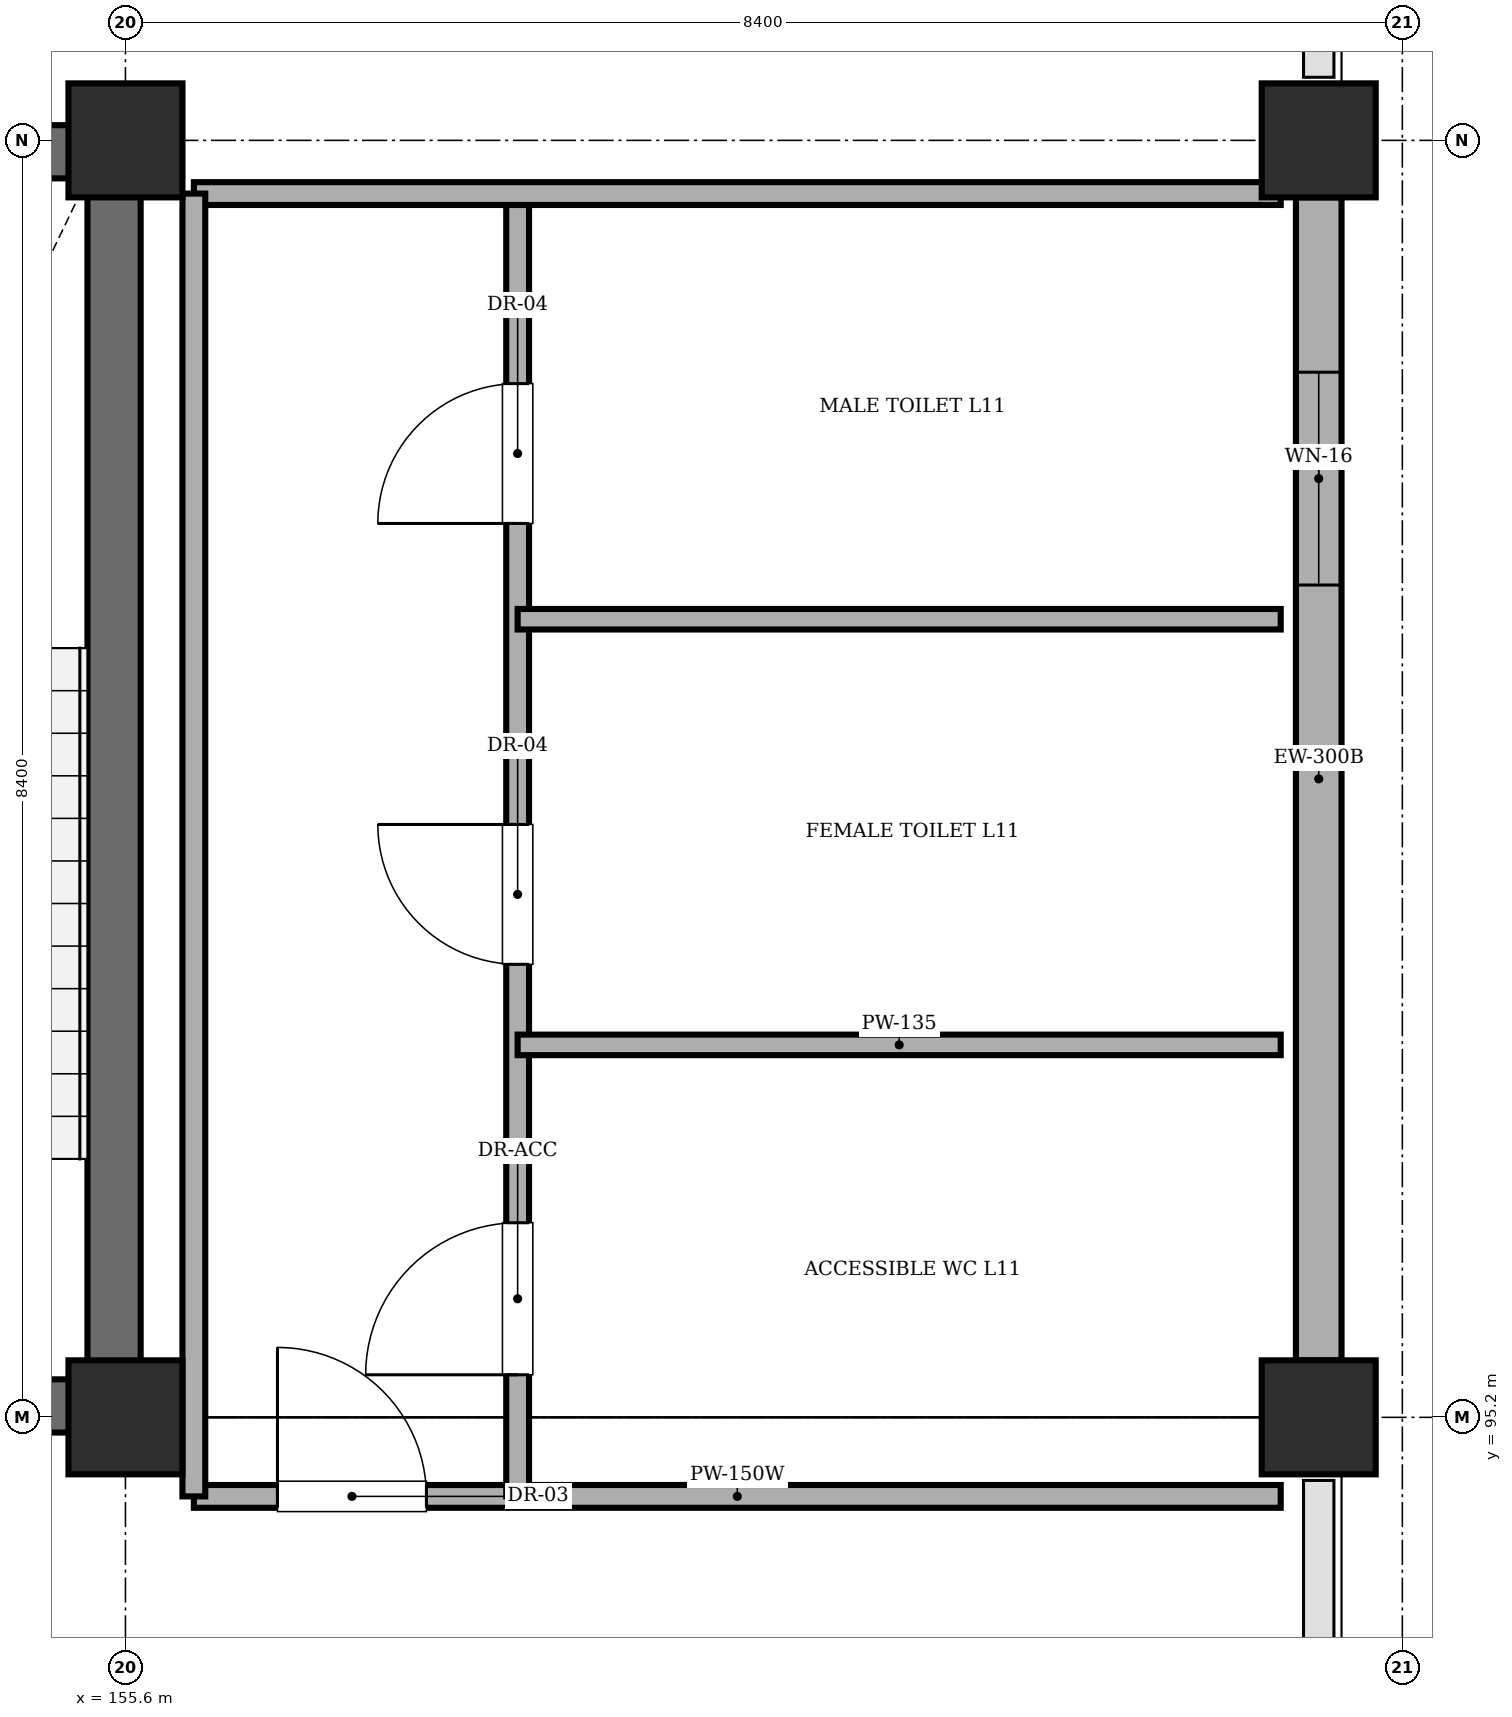
"""IFC4 building model, lengths in metres.
Left out: names, types, materials, properties, quantities, classifications, styles, units other than length and angle.
Written with IfcOpenShell. Run it as: python <this file> out.ifc"""

import sys

from ifc_helpers import new_model, si_unit, direction, frame, frame_2d, origin, origin_2d, place, context, subcontext, project, spatial, rectangle, extrude, element, fill, save


model = new_model("IFC4")
c1 = context("Model", 3, precision=1e-05, world=origin(), true_north=direction((0.0, 1.0)))
c2 = subcontext(c1, "Body", "Model", "MODEL_VIEW")
j1 = project(units=[si_unit("LENGTHUNIT", "METRE"), si_unit("PLANEANGLEUNIT", "RADIAN")], contexts=[c1])
p1 = place(None, origin())
s1 = spatial("IfcSite", under=j1, at=p1, CompositionType="ELEMENT")
p2 = place(p1, origin())
s2 = spatial("IfcBuilding", under=s1, at=p2, CompositionType="ELEMENT")
p3 = place(p2, frame((0.0, 0.0, 44.4)))
s3 = spatial("IfcBuildingStorey", under=s2, at=p3, CompositionType="ELEMENT", Elevation=44.4)
for number, where, z_axis, x_axis in (
    (1, (155.6, 95.2, 0.0), (0.0, 0.0, 1.0), (1.0, 0.0, 0.0)),
    (2, (155.6, 103.6, 0.0), (0.0, 0.0, 1.0), (1.0, 0.0, 0.0)),
    (3, (163.45, 95.2, 0.0), (0.0, 0.0, 1.0), (1.0, 0.0, 0.0)),
    (4, (163.45, 103.6, 0.0), (0.0, 0.0, 1.0), (1.0, 0.0, 0.0)),
):
    element("IfcColumn", number, at=place(p3, frame(where, z_axis=z_axis, x_axis=x_axis)), inside=s3, PredefinedType="COLUMN", context=c2, shape_type="SweptSolid", body=[
        extrude(rectangle(XDim=0.75, YDim=0.75, at=origin_2d()), origin(), (0.0, 0.0, 1.0), 4.01),
    ])
for number, where, z_axis, x_axis in (
    (5, (151.9, 95.275, 0.0), (0.0, 0.0, 1.0), (1.0, 0.0, 0.0)),
    (6, (151.9, 103.525, 0.0), (0.0, 0.0, 1.0), (1.0, 0.0, 0.0)),
):
    element("IfcWall", number, at=place(p3, frame(where, z_axis=z_axis, x_axis=x_axis)), inside=s3, PredefinedType="SHEAR", context=c2, shape_type="SweptSolid", body=[
        extrude(rectangle(XDim=3.8, YDim=0.35, at=frame_2d((1.9, 0.0))), origin(), (0.0, 0.0, 1.0), 4.01),
    ])
p4 = place(p3, frame((155.525, 95.45, 0.0), z_axis=(0.0, 0.0, 1.0), x_axis=(0.0, 1.0, 0.0)))
e7 = element("IfcWall", 7, at=p4, inside=s3, PredefinedType="SHEAR", context=c2, shape_type="SweptSolid", body=[
    extrude(rectangle(XDim=7.9, YDim=0.35, at=frame_2d((3.95, 0.0))), origin(), (0.0, 0.0, 1.0), 4.01),
])
p5 = place(p3, frame((163.45, 103.225, 0.0), z_axis=(0.0, 0.0, 1.0), x_axis=(0.0, -1.0, 0.0)))
e8 = element("IfcWall", 8, at=p5, inside=s3, PredefinedType="STANDARD", context=c2, shape_type="SweptSolid", body=[
    extrude(rectangle(XDim=7.65, YDim=0.3, at=frame_2d((3.825, 0.0))), origin(), (0.0, 0.0, 1.0), 3.31),
])
p6 = place(p5, frame((1.15, 0.0, 1.1)))
e9 = element("IfcOpeningElement", 9, at=p6, cuts=e8, PredefinedType="OPENING", context=c2, shape_type="SweptSolid", body=[
    extrude(rectangle(XDim=1.4, YDim=1.4, at=frame_2d((0.7, 0.7))), frame((0.0, 0.16, 0.0), z_axis=(0.0, -1.0, 0.0), x_axis=(1.0, 0.0, 0.0)), (0.0, 0.0, 1.0), 0.32),
])
p7 = place(p3, frame((156.05, 94.68, 0.0), z_axis=(0.0, 0.0, 1.0), x_axis=(1.0, 0.0, 0.0)))
e10 = element("IfcWall", 10, at=p7, inside=s3, PredefinedType="PARTITIONING", context=c2, shape_type="SweptSolid", body=[
    extrude(rectangle(XDim=7.15, YDim=0.15, at=frame_2d((3.575, 0.0))), origin(), (0.0, 0.0, 1.0), 4.01),
])
p8 = place(p7, frame((0.55, 0.0, 0.0)))
e11 = element("IfcOpeningElement", 11, at=p8, cuts=e10, PredefinedType="OPENING", context=c2, shape_type="SweptSolid", body=[
    extrude(rectangle(XDim=0.98, YDim=2.12, at=frame_2d((0.49, 1.06))), frame((0.0, 0.085, 0.0), z_axis=(0.0, -1.0, 0.0), x_axis=(1.0, 0.0, 0.0)), (0.0, 0.0, 1.0), 0.17),
])
p9 = place(p3, frame((158.18, 94.68, 0.0), z_axis=(0.0, 0.0, 1.0), x_axis=(0.0, 1.0, 0.0)))
e12 = element("IfcWall", 12, at=p9, inside=s3, PredefinedType="PARTITIONING", context=c2, shape_type="SweptSolid", body=[
    extrude(rectangle(XDim=8.57, YDim=0.15, at=frame_2d((4.285, 0.0))), origin(), (0.0, 0.0, 1.0), 4.01),
])
p10 = place(p9, frame((0.8, 0.0, 0.0)))
e13 = element("IfcOpeningElement", 13, at=p10, cuts=e12, PredefinedType="OPENING", context=c2, shape_type="SweptSolid", body=[
    extrude(rectangle(XDim=1.0, YDim=2.12, at=frame_2d((0.5, 1.06))), frame((0.0, 0.085, 0.0), z_axis=(0.0, -1.0, 0.0), x_axis=(1.0, 0.0, 0.0)), (0.0, 0.0, 1.0), 0.17),
])
p11 = place(p9, frame((3.5, 0.0, 0.0)))
e14 = element("IfcOpeningElement", 14, at=p11, cuts=e12, PredefinedType="OPENING", context=c2, shape_type="SweptSolid", body=[
    extrude(rectangle(XDim=0.92, YDim=2.1, at=frame_2d((0.46, 1.05))), frame((0.0, 0.085, 0.0), z_axis=(0.0, -1.0, 0.0), x_axis=(1.0, 0.0, 0.0)), (0.0, 0.0, 1.0), 0.17),
])
p12 = place(p9, frame((6.4, 0.0, 0.0)))
e15 = element("IfcOpeningElement", 15, at=p12, cuts=e12, PredefinedType="OPENING", context=c2, shape_type="SweptSolid", body=[
    extrude(rectangle(XDim=0.92, YDim=2.1, at=frame_2d((0.46, 1.05))), frame((0.0, 0.085, 0.0), z_axis=(0.0, -1.0, 0.0), x_axis=(1.0, 0.0, 0.0)), (0.0, 0.0, 1.0), 0.17),
])
for number, where, z_axis, x_axis in (
    (16, (158.18, 97.65, 0.0), (0.0, 0.0, 1.0), (1.0, 0.0, 0.0)),
    (17, (158.18, 100.45, 0.0), (0.0, 0.0, 1.0), (1.0, 0.0, 0.0)),
):
    element("IfcWall", number, at=place(p3, frame(where, z_axis=z_axis, x_axis=x_axis)), inside=s3, PredefinedType="PARTITIONING", context=c2, shape_type="SweptSolid", body=[
        extrude(rectangle(XDim=5.02, YDim=0.135, at=frame_2d((2.51, 0.0))), origin(), (0.0, 0.0, 1.0), 4.01),
    ])
p13 = place(p3, frame((156.05, 103.25, 0.0), z_axis=(0.0, 0.0, 1.0), x_axis=(1.0, 0.0, 0.0)))
e18 = element("IfcWall", 18, at=p13, inside=s3, PredefinedType="PARTITIONING", context=c2, shape_type="SweptSolid", body=[
    extrude(rectangle(XDim=7.15, YDim=0.15, at=frame_2d((3.575, 0.0))), origin(), (0.0, 0.0, 1.0), 4.01),
])
p14 = place(p3, frame((156.05, 94.68, 0.0), z_axis=(0.0, 0.0, 1.0), x_axis=(0.0, 1.0, 0.0)))
e19 = element("IfcWall", 19, at=p14, inside=s3, PredefinedType="PARTITIONING", context=c2, shape_type="SweptSolid", body=[
    extrude(rectangle(XDim=8.57, YDim=0.15, at=frame_2d((4.285, 0.0))), origin(), (0.0, 0.0, 1.0), 4.01),
])
p15 = place(p6, origin())
e20 = element("IfcWindow", 20, at=p15, inside=s3, PartitioningType="SINGLE_PANEL", PredefinedType="WINDOW", context=c2, shape_type="SweptSolid", body=[
    extrude(rectangle(XDim=1.4, YDim=1.4, at=frame_2d((0.7, 0.7))), frame((0.0, 0.03, 0.0), z_axis=(0.0, -1.0, 0.0), x_axis=(1.0, 0.0, 0.0)), (0.0, 0.0, 1.0), 0.06),
])
fill(e9, e20)
p16 = place(p8, origin())
e21 = element("IfcDoor", 21, at=p16, inside=s3, OperationType="SINGLE_SWING_LEFT", PredefinedType="DOOR", context=c2, shape_type="SweptSolid", body=[
    extrude(rectangle(XDim=0.98, YDim=2.12, at=frame_2d((0.49, 1.06))), frame((0.0, 0.025, 0.0), z_axis=(0.0, -1.0, 0.0), x_axis=(1.0, 0.0, 0.0)), (0.0, 0.0, 1.0), 0.05),
])
fill(e11, e21)
p17 = place(p10, origin())
e22 = element("IfcDoor", 22, at=p17, inside=s3, OperationType="SINGLE_SWING_LEFT", PredefinedType="DOOR", context=c2, shape_type="SweptSolid", body=[
    extrude(rectangle(XDim=1.0, YDim=2.12, at=frame_2d((0.5, 1.06))), frame((0.0, 0.025, 0.0), z_axis=(0.0, -1.0, 0.0), x_axis=(1.0, 0.0, 0.0)), (0.0, 0.0, 1.0), 0.05),
])
fill(e13, e22)
p18 = place(p11, origin())
e23 = element("IfcDoor", 23, at=p18, inside=s3, OperationType="SINGLE_SWING_RIGHT", PredefinedType="DOOR", context=c2, shape_type="SweptSolid", body=[
    extrude(rectangle(XDim=0.92, YDim=2.1, at=frame_2d((0.46, 1.05))), frame((0.0, 0.025, 0.0), z_axis=(0.0, -1.0, 0.0), x_axis=(1.0, 0.0, 0.0)), (0.0, 0.0, 1.0), 0.05),
])
fill(e14, e23)
p19 = place(p12, origin())
e24 = element("IfcDoor", 24, at=p19, inside=s3, OperationType="SINGLE_SWING_LEFT", PredefinedType="DOOR", context=c2, shape_type="SweptSolid", body=[
    extrude(rectangle(XDim=0.92, YDim=2.1, at=frame_2d((0.46, 1.05))), frame((0.0, 0.025, 0.0), z_axis=(0.0, -1.0, 0.0), x_axis=(1.0, 0.0, 0.0)), (0.0, 0.0, 1.0), 0.05),
])
fill(e15, e24)
save(model, sys.argv[1])
